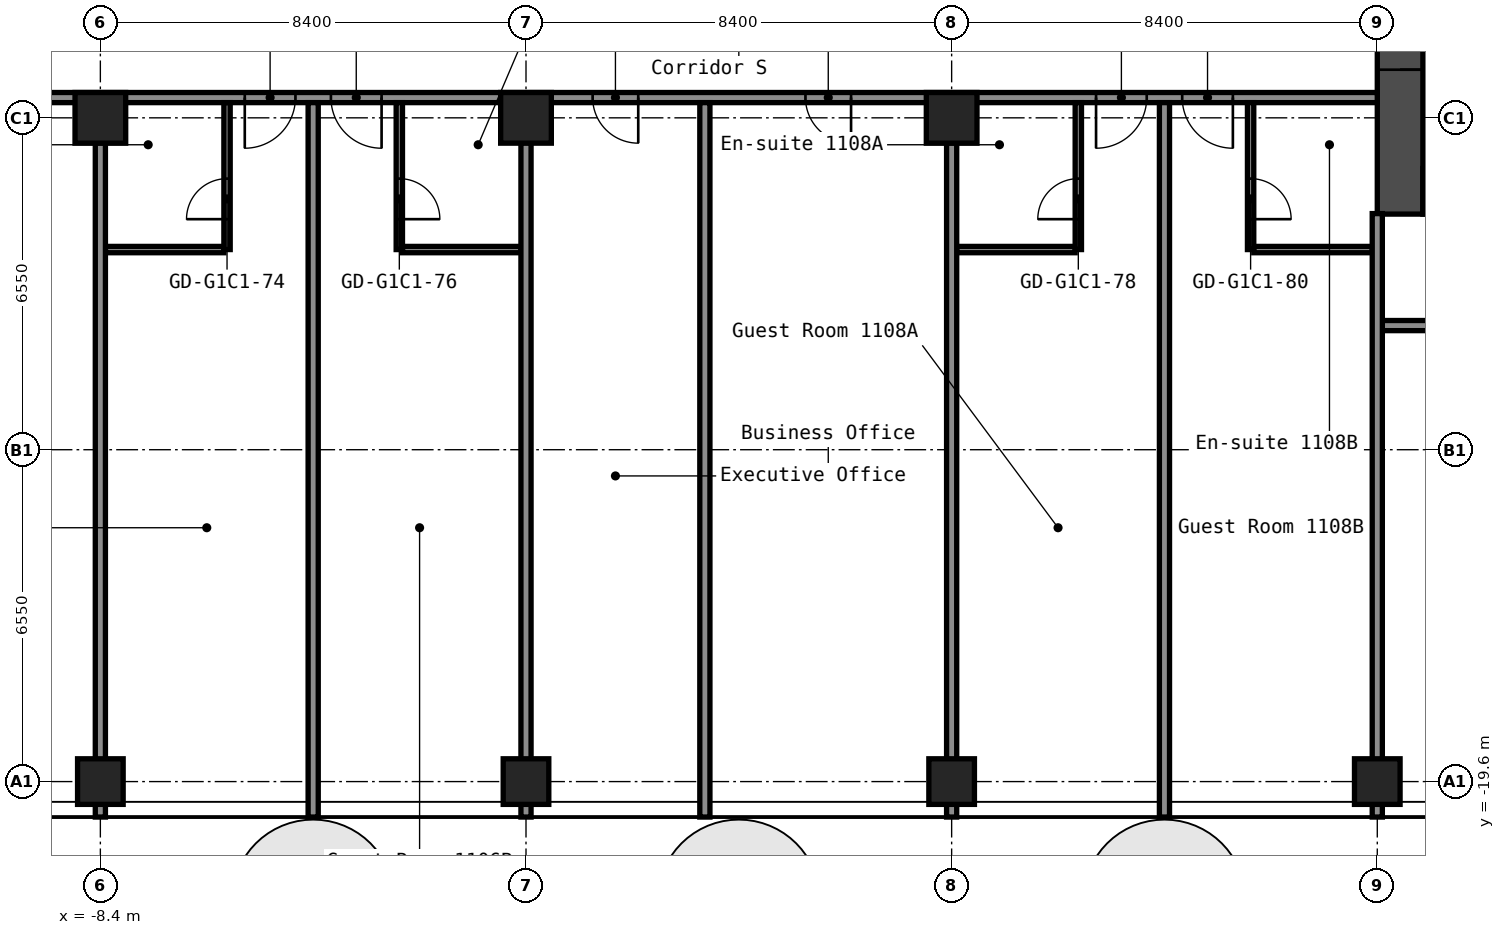
"""IFC4 building model, lengths in metres.
Left out: names, types, materials, properties, quantities, classifications, styles, units other than length and angle.
Written with IfcOpenShell. Run it as: python <this file> out.ifc"""

import sys

from ifc_helpers import new_model, si_unit, direction, frame, frame_2d, origin, origin_2d, place, context, subcontext, project, spatial, rectangle, hollow_rectangle, extrude, element, fill, save


model = new_model("IFC4")
c1 = context("Model", 3, precision=1e-05, world=origin(), true_north=direction((0.0, 1.0)))
c2 = subcontext(c1, "Body", "Model", "MODEL_VIEW")
j1 = project(units=[si_unit("LENGTHUNIT", "METRE"), si_unit("PLANEANGLEUNIT", "RADIAN")], contexts=[c1])
p1 = place(None, origin())
s1 = spatial("IfcSite", under=j1, at=p1, CompositionType="ELEMENT")
p2 = place(p1, origin())
s2 = spatial("IfcBuilding", under=s1, at=p2, CompositionType="ELEMENT")
p3 = place(p2, frame((0.0, 0.0, 42.2)))
s3 = spatial("IfcBuildingStorey", under=s2, at=p3, CompositionType="ELEMENT", Elevation=42.2)
p4 = place(p3, frame((-8.4, -19.6, 0.0), z_axis=(0.0, 0.0, 1.0), x_axis=(1.0, 0.0, 0.0)))
e1 = element("IfcColumn", 1, at=p4, inside=s3, PredefinedType="COLUMN", context=c2, shape_type="SweptSolid", body=[
    extrude(hollow_rectangle(XDim=0.9, YDim=0.9, WallThickness=0.036, at=origin_2d()), origin(), (0.0, 0.0, 1.0), 2.8),
])
p5 = place(p3, frame((-8.4, -6.5, 0.0), z_axis=(0.0, 0.0, 1.0), x_axis=(1.0, 0.0, 0.0)))
e2 = element("IfcColumn", 2, at=p5, inside=s3, PredefinedType="COLUMN", context=c2, shape_type="SweptSolid", body=[
    extrude(hollow_rectangle(XDim=1.0, YDim=1.0, WallThickness=0.04, at=origin_2d()), origin(), (0.0, 0.0, 1.0), 2.8),
])
p6 = place(p3, frame((0.0, -19.6, 0.0), z_axis=(0.0, 0.0, 1.0), x_axis=(1.0, 0.0, 0.0)))
e3 = element("IfcColumn", 3, at=p6, inside=s3, PredefinedType="COLUMN", context=c2, shape_type="SweptSolid", body=[
    extrude(hollow_rectangle(XDim=0.9, YDim=0.9, WallThickness=0.036, at=origin_2d()), origin(), (0.0, 0.0, 1.0), 2.8),
])
p7 = place(p3, frame((0.0, -6.5, 0.0), z_axis=(0.0, 0.0, 1.0), x_axis=(1.0, 0.0, 0.0)))
e4 = element("IfcColumn", 4, at=p7, inside=s3, PredefinedType="COLUMN", context=c2, shape_type="SweptSolid", body=[
    extrude(hollow_rectangle(XDim=1.0, YDim=1.0, WallThickness=0.04, at=origin_2d()), origin(), (0.0, 0.0, 1.0), 2.8),
])
p8 = place(p3, frame((8.4, -19.6, 0.0), z_axis=(0.0, 0.0, 1.0), x_axis=(1.0, 0.0, 0.0)))
e5 = element("IfcColumn", 5, at=p8, inside=s3, PredefinedType="COLUMN", context=c2, shape_type="SweptSolid", body=[
    extrude(hollow_rectangle(XDim=0.9, YDim=0.9, WallThickness=0.036, at=origin_2d()), origin(), (0.0, 0.0, 1.0), 2.8),
])
p9 = place(p3, frame((8.4, -6.5, 0.0), z_axis=(0.0, 0.0, 1.0), x_axis=(1.0, 0.0, 0.0)))
e6 = element("IfcColumn", 6, at=p9, inside=s3, PredefinedType="COLUMN", context=c2, shape_type="SweptSolid", body=[
    extrude(hollow_rectangle(XDim=1.0, YDim=1.0, WallThickness=0.04, at=origin_2d()), origin(), (0.0, 0.0, 1.0), 2.8),
])
p10 = place(p3, frame((16.8, -19.6, 0.0), z_axis=(0.0, 0.0, 1.0), x_axis=(1.0, 0.0, 0.0)))
e7 = element("IfcColumn", 7, at=p10, inside=s3, PredefinedType="COLUMN", context=c2, shape_type="SweptSolid", body=[
    extrude(hollow_rectangle(XDim=0.9, YDim=0.9, WallThickness=0.036, at=origin_2d()), origin(), (0.0, 0.0, 1.0), 2.8),
])
p11 = place(p3, frame((17.25, -8.4, 0.0), z_axis=(0.0, 0.0, 1.0), x_axis=(0.0, 1.0, 0.0)))
e8 = element("IfcWall", 8, at=p11, inside=s3, PredefinedType="SHEAR", context=c2, shape_type="SweptSolid", body=[
    extrude(rectangle(XDim=16.8, YDim=0.9, at=frame_2d((8.4, 0.0))), origin(), (0.0, 0.0, 1.0), 2.8),
])
p12 = place(p11, frame((12.75, 0.0, 0.0)))
e9 = element("IfcOpeningElement", 9, at=p12, cuts=e8, PredefinedType="OPENING", context=c2, shape_type="SweptSolid", body=[
    extrude(rectangle(XDim=1.2, YDim=2.1, at=frame_2d((0.6, 1.05))), frame((0.0, 0.46, 0.0), z_axis=(0.0, -1.0, 0.0), x_axis=(1.0, 0.0, 0.0)), (0.0, 0.0, 1.0), 0.92),
])
p13 = place(p11, frame((2.85, 0.0, 0.0)))
e10 = element("IfcOpeningElement", 10, at=p13, cuts=e8, PredefinedType="OPENING", context=c2, shape_type="SweptSolid", body=[
    extrude(rectangle(XDim=1.2, YDim=2.1, at=frame_2d((0.6, 1.05))), frame((0.0, 0.46, 0.0), z_axis=(0.0, -1.0, 0.0), x_axis=(1.0, 0.0, 0.0)), (0.0, 0.0, 1.0), 0.92),
])
p14 = place(p3, frame((17.7, -7.95, 0.0), z_axis=(0.0, 0.0, 1.0), x_axis=(1.0, 0.0, 0.0)))
e11 = element("IfcWall", 11, at=p14, inside=s3, PredefinedType="SHEAR", context=c2, shape_type="SweptSolid", body=[
    extrude(rectangle(XDim=15.0, YDim=0.9, at=frame_2d((7.5, 0.0))), origin(), (0.0, 0.0, 1.0), 2.8),
])
p15 = place(p14, frame((2.55, 0.0, 0.0)))
e12 = element("IfcOpeningElement", 12, at=p15, cuts=e11, PredefinedType="OPENING", context=c2, shape_type="SweptSolid", body=[
    extrude(rectangle(XDim=1.0, YDim=2.1, at=frame_2d((0.5, 1.05))), frame((0.0, 0.46, 0.0), z_axis=(0.0, -1.0, 0.0), x_axis=(1.0, 0.0, 0.0)), (0.0, 0.0, 1.0), 0.92),
])
p16 = place(p3, frame((16.8, -10.6, 0.0), z_axis=(0.0, 0.0, 1.0), x_axis=(1.0, 0.0, 0.0)))
e13 = element("IfcWall", 13, at=p16, inside=s3, PredefinedType="PARTITIONING", context=c2, shape_type="SweptSolid", body=[
    extrude(rectangle(XDim=34.3, YDim=0.2, at=frame_2d((17.15, 0.0))), origin(), (0.0, 0.0, 1.0), 2.8),
])
p17 = place(p16, frame((2.0, 0.0, 0.0)))
e14 = element("IfcOpeningElement", 14, at=p17, cuts=e13, PredefinedType="OPENING", context=c2, shape_type="SweptSolid", body=[
    extrude(rectangle(XDim=1.0, YDim=2.1, at=frame_2d((0.5, 1.05))), frame((0.0, 0.11, 0.0), z_axis=(0.0, -1.0, 0.0), x_axis=(1.0, 0.0, 0.0)), (0.0, 0.0, 1.0), 0.22),
])
p18 = place(p16, frame((11.25, 0.0, 0.0)))
e15 = element("IfcOpeningElement", 15, at=p18, cuts=e13, PredefinedType="OPENING", context=c2, shape_type="SweptSolid", body=[
    extrude(rectangle(XDim=1.0, YDim=2.1, at=frame_2d((0.5, 1.05))), frame((0.0, 0.11, 0.0), z_axis=(0.0, -1.0, 0.0), x_axis=(1.0, 0.0, 0.0)), (0.0, 0.0, 1.0), 0.22),
])
p19 = place(p16, frame((12.95, 0.0, 0.0)))
e16 = element("IfcOpeningElement", 16, at=p19, cuts=e13, PredefinedType="OPENING", context=c2, shape_type="SweptSolid", body=[
    extrude(rectangle(XDim=1.0, YDim=2.1, at=frame_2d((0.5, 1.05))), frame((0.0, 0.11, 0.0), z_axis=(0.0, -1.0, 0.0), x_axis=(1.0, 0.0, 0.0)), (0.0, 0.0, 1.0), 0.22),
])
p20 = place(p16, frame((18.8, 0.0, 0.0)))
e17 = element("IfcOpeningElement", 17, at=p20, cuts=e13, PredefinedType="OPENING", context=c2, shape_type="SweptSolid", body=[
    extrude(rectangle(XDim=1.0, YDim=2.1, at=frame_2d((0.5, 1.05))), frame((0.0, 0.11, 0.0), z_axis=(0.0, -1.0, 0.0), x_axis=(1.0, 0.0, 0.0)), (0.0, 0.0, 1.0), 0.22),
])
p21 = place(p16, frame((28.15, 0.0, 0.0)))
e18 = element("IfcOpeningElement", 18, at=p21, cuts=e13, PredefinedType="OPENING", context=c2, shape_type="SweptSolid", body=[
    extrude(rectangle(XDim=1.0, YDim=2.1, at=frame_2d((0.5, 1.05))), frame((0.0, 0.11, 0.0), z_axis=(0.0, -1.0, 0.0), x_axis=(1.0, 0.0, 0.0)), (0.0, 0.0, 1.0), 0.22),
])
p22 = place(p16, frame((30.05, 0.0, 0.0)))
e19 = element("IfcOpeningElement", 19, at=p22, cuts=e13, PredefinedType="OPENING", context=c2, shape_type="SweptSolid", body=[
    extrude(rectangle(XDim=1.0, YDim=2.1, at=frame_2d((0.5, 1.05))), frame((0.0, 0.11, 0.0), z_axis=(0.0, -1.0, 0.0), x_axis=(1.0, 0.0, 0.0)), (0.0, 0.0, 1.0), 0.22),
])
p23 = place(p3, frame((-8.3, -9.1, 0.0), z_axis=(0.0, 0.0, 1.0), x_axis=(1.0, 0.0, 0.0)))
e20 = element("IfcWall", 20, at=p23, inside=s3, PredefinedType="PARTITIONING", context=c2, shape_type="SweptSolid", body=[
    extrude(rectangle(XDim=2.338, YDim=0.125, at=frame_2d((1.169, 0.0))), origin(), (0.0, 0.0, 1.0), 2.8),
])
for number, where, z_axis, x_axis in (
    (21, (-2.438, -9.1, 0.0), (0.0, 0.0, 1.0), (1.0, 0.0, 0.0)),
    (22, (8.5, -9.1, 0.0), (0.0, 0.0, 1.0), (1.0, 0.0, 0.0)),
    (23, (14.363, -9.1, 0.0), (0.0, 0.0, 1.0), (1.0, 0.0, 0.0)),
):
    element("IfcWall", number, at=place(p3, frame(where, z_axis=z_axis, x_axis=x_axis)), inside=s3, PredefinedType="PARTITIONING", context=c2, shape_type="SweptSolid", body=[
        extrude(rectangle(XDim=2.337, YDim=0.125, at=frame_2d((1.169, 0.0))), origin(), (0.0, 0.0, 1.0), 2.8),
    ])
p24 = place(p3, frame((-16.8, -6.1, 0.0), z_axis=(0.0, 0.0, 1.0), x_axis=(1.0, 0.0, 0.0)))
e24 = element("IfcWall", 24, at=p24, inside=s3, PredefinedType="PARTITIONING", context=c2, shape_type="SweptSolid", body=[
    extrude(rectangle(XDim=33.6, YDim=0.2, at=frame_2d((16.8, 0.0))), origin(), (0.0, 0.0, 1.0), 2.8),
])
p25 = place(p24, frame((5.4, 0.0, 0.0)))
e25 = element("IfcOpeningElement", 25, at=p25, cuts=e24, PredefinedType="OPENING", context=c2, shape_type="SweptSolid", body=[
    extrude(rectangle(XDim=1.0, YDim=2.1, at=frame_2d((0.5, 1.05))), frame((0.0, 0.11, 0.0), z_axis=(0.0, -1.0, 0.0), x_axis=(1.0, 0.0, 0.0)), (0.0, 0.0, 1.0), 0.22),
])
p26 = place(p24, frame((11.25, 0.0, 0.0)))
e26 = element("IfcOpeningElement", 26, at=p26, cuts=e24, PredefinedType="OPENING", context=c2, shape_type="SweptSolid", body=[
    extrude(rectangle(XDim=1.0, YDim=2.1, at=frame_2d((0.5, 1.05))), frame((0.0, 0.11, 0.0), z_axis=(0.0, -1.0, 0.0), x_axis=(1.0, 0.0, 0.0)), (0.0, 0.0, 1.0), 0.22),
])
p27 = place(p24, frame((12.95, 0.0, 0.0)))
e27 = element("IfcOpeningElement", 27, at=p27, cuts=e24, PredefinedType="OPENING", context=c2, shape_type="SweptSolid", body=[
    extrude(rectangle(XDim=1.0, YDim=2.1, at=frame_2d((0.5, 1.05))), frame((0.0, 0.11, 0.0), z_axis=(0.0, -1.0, 0.0), x_axis=(1.0, 0.0, 0.0)), (0.0, 0.0, 1.0), 0.22),
])
p28 = place(p24, frame((18.115, 0.0, 0.0)))
e28 = element("IfcOpeningElement", 28, at=p28, cuts=e24, PredefinedType="OPENING", context=c2, shape_type="SweptSolid", body=[
    extrude(rectangle(XDim=0.9, YDim=2.1, at=frame_2d((0.45, 1.05))), frame((0.0, 0.11, 0.0), z_axis=(0.0, -1.0, 0.0), x_axis=(1.0, 0.0, 0.0)), (0.0, 0.0, 1.0), 0.22),
])
p29 = place(p24, frame((22.315, 0.0, 0.0)))
e29 = element("IfcOpeningElement", 29, at=p29, cuts=e24, PredefinedType="OPENING", context=c2, shape_type="SweptSolid", body=[
    extrude(rectangle(XDim=0.9, YDim=2.1, at=frame_2d((0.45, 1.05))), frame((0.0, 0.11, 0.0), z_axis=(0.0, -1.0, 0.0), x_axis=(1.0, 0.0, 0.0)), (0.0, 0.0, 1.0), 0.22),
])
p30 = place(p24, frame((28.05, 0.0, 0.0)))
e30 = element("IfcOpeningElement", 30, at=p30, cuts=e24, PredefinedType="OPENING", context=c2, shape_type="SweptSolid", body=[
    extrude(rectangle(XDim=1.0, YDim=2.1, at=frame_2d((0.5, 1.05))), frame((0.0, 0.11, 0.0), z_axis=(0.0, -1.0, 0.0), x_axis=(1.0, 0.0, 0.0)), (0.0, 0.0, 1.0), 0.22),
])
p31 = place(p24, frame((29.75, 0.0, 0.0)))
e31 = element("IfcOpeningElement", 31, at=p31, cuts=e24, PredefinedType="OPENING", context=c2, shape_type="SweptSolid", body=[
    extrude(rectangle(XDim=1.0, YDim=2.1, at=frame_2d((0.5, 1.05))), frame((0.0, 0.11, 0.0), z_axis=(0.0, -1.0, 0.0), x_axis=(1.0, 0.0, 0.0)), (0.0, 0.0, 1.0), 0.22),
])
p32 = place(p3, frame((-8.4, -20.3, 0.0), z_axis=(0.0, 0.0, 1.0), x_axis=(0.0, 1.0, 0.0)))
e32 = element("IfcWall", 32, at=p32, inside=s3, PredefinedType="PARTITIONING", context=c2, shape_type="SweptSolid", body=[
    extrude(rectangle(XDim=13.31, YDim=0.2, at=frame_2d((6.655, 0.0))), origin(), (0.0, 0.0, 1.0), 2.8),
])
p33 = place(p3, frame((-5.9, -9.1, 0.0), z_axis=(0.0, 0.0, 1.0), x_axis=(0.0, 1.0, 0.0)))
e33 = element("IfcWall", 33, at=p33, inside=s3, PredefinedType="PARTITIONING", context=c2, shape_type="SweptSolid", body=[
    extrude(rectangle(XDim=2.9, YDim=0.125, at=frame_2d((1.45, 0.0))), origin(), (0.0, 0.0, 1.0), 2.8),
])
p34 = place(p33, frame((0.6, 0.0, 0.0)))
e34 = element("IfcOpeningElement", 34, at=p34, cuts=e33, PredefinedType="OPENING", context=c2, shape_type="SweptSolid", body=[
    extrude(rectangle(XDim=0.8, YDim=2.1, at=frame_2d((0.4, 1.05))), frame((0.0, 0.073, 0.0), z_axis=(0.0, -1.0, 0.0), x_axis=(1.0, 0.0, 0.0)), (0.0, 0.0, 1.0), 0.145),
])
p35 = place(p3, frame((-4.2, -20.3, 0.0), z_axis=(0.0, 0.0, 1.0), x_axis=(0.0, 1.0, 0.0)))
e35 = element("IfcWall", 35, at=p35, inside=s3, PredefinedType="PARTITIONING", context=c2, shape_type="SweptSolid", body=[
    extrude(rectangle(XDim=14.1, YDim=0.2, at=frame_2d((7.05, 0.0))), origin(), (0.0, 0.0, 1.0), 2.8),
])
p36 = place(p3, frame((-2.5, -9.1, 0.0), z_axis=(0.0, 0.0, 1.0), x_axis=(0.0, 1.0, 0.0)))
e36 = element("IfcWall", 36, at=p36, inside=s3, PredefinedType="PARTITIONING", context=c2, shape_type="SweptSolid", body=[
    extrude(rectangle(XDim=2.9, YDim=0.125, at=frame_2d((1.45, 0.0))), origin(), (0.0, 0.0, 1.0), 2.8),
])
p37 = place(p36, frame((0.6, 0.0, 0.0)))
e37 = element("IfcOpeningElement", 37, at=p37, cuts=e36, PredefinedType="OPENING", context=c2, shape_type="SweptSolid", body=[
    extrude(rectangle(XDim=0.8, YDim=2.1, at=frame_2d((0.4, 1.05))), frame((0.0, 0.073, 0.0), z_axis=(0.0, -1.0, 0.0), x_axis=(1.0, 0.0, 0.0)), (0.0, 0.0, 1.0), 0.145),
])
p38 = place(p3, frame((0.0, -20.3, 0.0), z_axis=(0.0, 0.0, 1.0), x_axis=(0.0, 1.0, 0.0)))
e38 = element("IfcWall", 38, at=p38, inside=s3, PredefinedType="PARTITIONING", context=c2, shape_type="SweptSolid", body=[
    extrude(rectangle(XDim=13.31, YDim=0.2, at=frame_2d((6.655, 0.0))), origin(), (0.0, 0.0, 1.0), 2.8),
])
p39 = place(p3, frame((3.53, -20.3, 0.0), z_axis=(0.0, 0.0, 1.0), x_axis=(0.0, 1.0, 0.0)))
e39 = element("IfcWall", 39, at=p39, inside=s3, PredefinedType="PARTITIONING", context=c2, shape_type="SweptSolid", body=[
    extrude(rectangle(XDim=14.1, YDim=0.2, at=frame_2d((7.05, 0.0))), origin(), (0.0, 0.0, 1.0), 2.8),
])
p40 = place(p3, frame((8.4, -20.3, 0.0), z_axis=(0.0, 0.0, 1.0), x_axis=(0.0, 1.0, 0.0)))
e40 = element("IfcWall", 40, at=p40, inside=s3, PredefinedType="PARTITIONING", context=c2, shape_type="SweptSolid", body=[
    extrude(rectangle(XDim=13.31, YDim=0.2, at=frame_2d((6.655, 0.0))), origin(), (0.0, 0.0, 1.0), 2.8),
])
p41 = place(p3, frame((10.9, -9.1, 0.0), z_axis=(0.0, 0.0, 1.0), x_axis=(0.0, 1.0, 0.0)))
e41 = element("IfcWall", 41, at=p41, inside=s3, PredefinedType="PARTITIONING", context=c2, shape_type="SweptSolid", body=[
    extrude(rectangle(XDim=2.9, YDim=0.125, at=frame_2d((1.45, 0.0))), origin(), (0.0, 0.0, 1.0), 2.8),
])
p42 = place(p41, frame((0.6, 0.0, 0.0)))
e42 = element("IfcOpeningElement", 42, at=p42, cuts=e41, PredefinedType="OPENING", context=c2, shape_type="SweptSolid", body=[
    extrude(rectangle(XDim=0.8, YDim=2.1, at=frame_2d((0.4, 1.05))), frame((0.0, 0.073, 0.0), z_axis=(0.0, -1.0, 0.0), x_axis=(1.0, 0.0, 0.0)), (0.0, 0.0, 1.0), 0.145),
])
p43 = place(p3, frame((12.6, -20.3, 0.0), z_axis=(0.0, 0.0, 1.0), x_axis=(0.0, 1.0, 0.0)))
e43 = element("IfcWall", 43, at=p43, inside=s3, PredefinedType="PARTITIONING", context=c2, shape_type="SweptSolid", body=[
    extrude(rectangle(XDim=14.1, YDim=0.2, at=frame_2d((7.05, 0.0))), origin(), (0.0, 0.0, 1.0), 2.8),
])
p44 = place(p3, frame((14.3, -9.1, 0.0), z_axis=(0.0, 0.0, 1.0), x_axis=(0.0, 1.0, 0.0)))
e44 = element("IfcWall", 44, at=p44, inside=s3, PredefinedType="PARTITIONING", context=c2, shape_type="SweptSolid", body=[
    extrude(rectangle(XDim=2.9, YDim=0.125, at=frame_2d((1.45, 0.0))), origin(), (0.0, 0.0, 1.0), 2.8),
])
p45 = place(p44, frame((0.6, 0.0, 0.0)))
e45 = element("IfcOpeningElement", 45, at=p45, cuts=e44, PredefinedType="OPENING", context=c2, shape_type="SweptSolid", body=[
    extrude(rectangle(XDim=0.8, YDim=2.1, at=frame_2d((0.4, 1.05))), frame((0.0, 0.073, 0.0), z_axis=(0.0, -1.0, 0.0), x_axis=(1.0, 0.0, 0.0)), (0.0, 0.0, 1.0), 0.145),
])
p46 = place(p3, frame((16.8, -20.3, 0.0), z_axis=(0.0, 0.0, 1.0), x_axis=(0.0, 1.0, 0.0)))
e46 = element("IfcWall", 46, at=p46, inside=s3, PredefinedType="PARTITIONING", context=c2, shape_type="SweptSolid", body=[
    extrude(rectangle(XDim=11.91, YDim=0.2, at=frame_2d((5.955, 0.0))), origin(), (0.0, 0.0, 1.0), 2.8),
])
p47 = place(p13, origin())
e47 = element("IfcDoor", 47, at=p47, inside=s3, OperationType="DOUBLE_DOOR_SINGLE_SWING", PredefinedType="DOOR", context=c2, shape_type="SweptSolid", body=[
    extrude(rectangle(XDim=1.2, YDim=2.1, at=frame_2d((0.6, 1.05))), frame((0.0, 0.025, 0.0), z_axis=(0.0, -1.0, 0.0), x_axis=(1.0, 0.0, 0.0)), (0.0, 0.0, 1.0), 0.05),
])
fill(e10, e47)
p48 = place(p26, origin())
e48 = element("IfcDoor", 48, at=p48, inside=s3, OperationType="SINGLE_SWING_LEFT", PredefinedType="DOOR", context=c2, shape_type="SweptSolid", body=[
    extrude(rectangle(XDim=1.0, YDim=2.1, at=frame_2d((0.5, 1.05))), frame((0.0, 0.025, 0.0), z_axis=(0.0, -1.0, 0.0), x_axis=(1.0, 0.0, 0.0)), (0.0, 0.0, 1.0), 0.05),
])
fill(e26, e48)
p49 = place(p27, origin())
e49 = element("IfcDoor", 49, at=p49, inside=s3, OperationType="SINGLE_SWING_RIGHT", PredefinedType="DOOR", context=c2, shape_type="SweptSolid", body=[
    extrude(rectangle(XDim=1.0, YDim=2.1, at=frame_2d((0.5, 1.05))), frame((0.0, 0.025, 0.0), z_axis=(0.0, -1.0, 0.0), x_axis=(1.0, 0.0, 0.0)), (0.0, 0.0, 1.0), 0.05),
])
fill(e27, e49)
p50 = place(p28, origin())
e50 = element("IfcDoor", 50, at=p50, inside=s3, OperationType="SINGLE_SWING_RIGHT", PredefinedType="DOOR", context=c2, shape_type="SweptSolid", body=[
    extrude(rectangle(XDim=0.9, YDim=2.1, at=frame_2d((0.45, 1.05))), frame((0.0, 0.025, 0.0), z_axis=(0.0, -1.0, 0.0), x_axis=(1.0, 0.0, 0.0)), (0.0, 0.0, 1.0), 0.05),
])
fill(e28, e50)
p51 = place(p29, origin())
e51 = element("IfcDoor", 51, at=p51, inside=s3, OperationType="SINGLE_SWING_RIGHT", PredefinedType="DOOR", context=c2, shape_type="SweptSolid", body=[
    extrude(rectangle(XDim=0.9, YDim=2.1, at=frame_2d((0.45, 1.05))), frame((0.0, 0.025, 0.0), z_axis=(0.0, -1.0, 0.0), x_axis=(1.0, 0.0, 0.0)), (0.0, 0.0, 1.0), 0.05),
])
fill(e29, e51)
p52 = place(p30, origin())
e52 = element("IfcDoor", 52, at=p52, inside=s3, OperationType="SINGLE_SWING_LEFT", PredefinedType="DOOR", context=c2, shape_type="SweptSolid", body=[
    extrude(rectangle(XDim=1.0, YDim=2.1, at=frame_2d((0.5, 1.05))), frame((0.0, 0.025, 0.0), z_axis=(0.0, -1.0, 0.0), x_axis=(1.0, 0.0, 0.0)), (0.0, 0.0, 1.0), 0.05),
])
fill(e30, e52)
p53 = place(p31, origin())
e53 = element("IfcDoor", 53, at=p53, inside=s3, OperationType="SINGLE_SWING_RIGHT", PredefinedType="DOOR", context=c2, shape_type="SweptSolid", body=[
    extrude(rectangle(XDim=1.0, YDim=2.1, at=frame_2d((0.5, 1.05))), frame((0.0, 0.025, 0.0), z_axis=(0.0, -1.0, 0.0), x_axis=(1.0, 0.0, 0.0)), (0.0, 0.0, 1.0), 0.05),
])
fill(e31, e53)
p54 = place(p34, origin())
e54 = element("IfcDoor", 54, at=p54, inside=s3, OperationType="SINGLE_SWING_RIGHT", PredefinedType="DOOR", context=c2, shape_type="SweptSolid", body=[
    extrude(rectangle(XDim=0.8, YDim=2.1, at=frame_2d((0.4, 1.05))), frame((0.0, 0.025, 0.0), z_axis=(0.0, -1.0, 0.0), x_axis=(1.0, 0.0, 0.0)), (0.0, 0.0, 1.0), 0.05),
])
fill(e34, e54)
p55 = place(p37, origin())
e55 = element("IfcDoor", 55, at=p55, inside=s3, OperationType="SINGLE_SWING_LEFT", PredefinedType="DOOR", context=c2, shape_type="SweptSolid", body=[
    extrude(rectangle(XDim=0.8, YDim=2.1, at=frame_2d((0.4, 1.05))), frame((0.0, 0.025, 0.0), z_axis=(0.0, -1.0, 0.0), x_axis=(1.0, 0.0, 0.0)), (0.0, 0.0, 1.0), 0.05),
])
fill(e37, e55)
p56 = place(p42, origin())
e56 = element("IfcDoor", 56, at=p56, inside=s3, OperationType="SINGLE_SWING_RIGHT", PredefinedType="DOOR", context=c2, shape_type="SweptSolid", body=[
    extrude(rectangle(XDim=0.8, YDim=2.1, at=frame_2d((0.4, 1.05))), frame((0.0, 0.025, 0.0), z_axis=(0.0, -1.0, 0.0), x_axis=(1.0, 0.0, 0.0)), (0.0, 0.0, 1.0), 0.05),
])
fill(e42, e56)
p57 = place(p45, origin())
e57 = element("IfcDoor", 57, at=p57, inside=s3, OperationType="SINGLE_SWING_LEFT", PredefinedType="DOOR", context=c2, shape_type="SweptSolid", body=[
    extrude(rectangle(XDim=0.8, YDim=2.1, at=frame_2d((0.4, 1.05))), frame((0.0, 0.025, 0.0), z_axis=(0.0, -1.0, 0.0), x_axis=(1.0, 0.0, 0.0)), (0.0, 0.0, 1.0), 0.05),
])
fill(e45, e57)
save(model, sys.argv[1])
